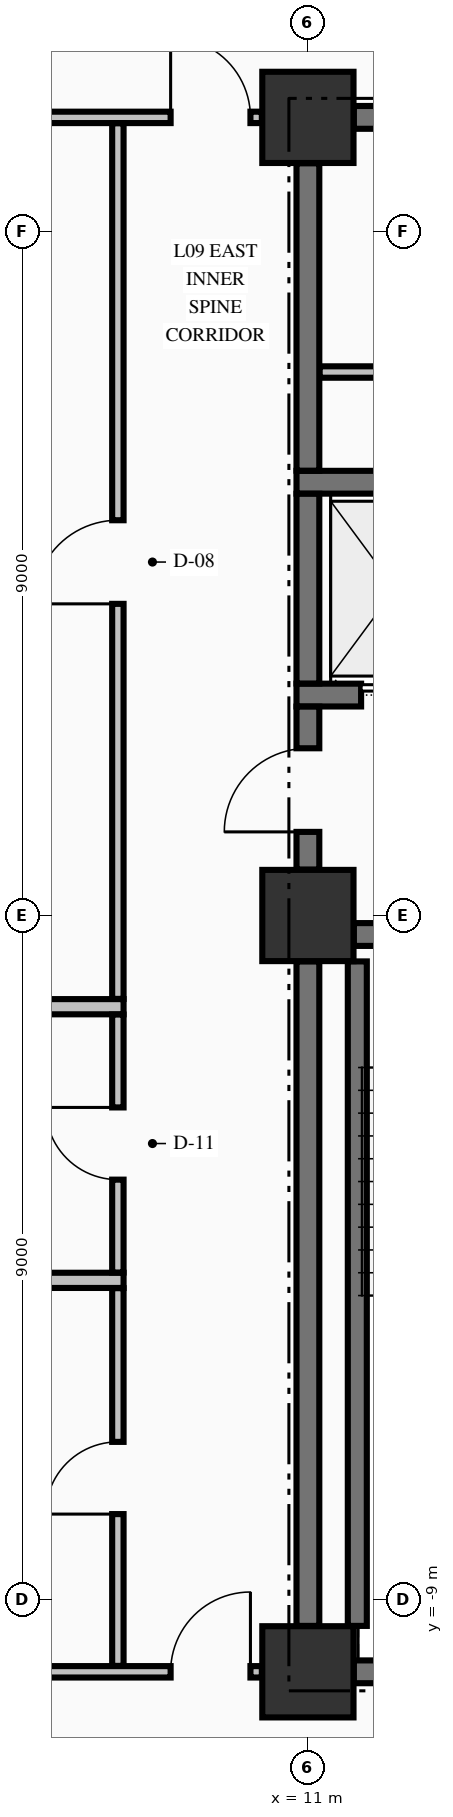
"""IFC4 building model, lengths in metres.
Left out: names, types, materials, properties, quantities, classifications, styles, units other than length and angle.
Written with IfcOpenShell. Run it as: python <this file> out.ifc"""

import sys

from ifc_helpers import new_model, si_unit, direction, frame, frame_2d, origin, origin_2d, place, context, subcontext, project, spatial, rectangle, extrude, element, fill, save


model = new_model("IFC4")
c1 = context("Model", 3, precision=1e-05, world=origin(), true_north=direction((0.0, 1.0)))
c2 = subcontext(c1, "Body", "Model", "MODEL_VIEW")
j1 = project(units=[si_unit("LENGTHUNIT", "METRE"), si_unit("PLANEANGLEUNIT", "RADIAN")], contexts=[c1])
p1 = place(None, origin())
s1 = spatial("IfcSite", under=j1, at=p1, CompositionType="ELEMENT")
p2 = place(p1, origin())
s2 = spatial("IfcBuilding", under=s1, at=p2, CompositionType="ELEMENT")
p3 = place(p2, frame((0.0, 0.0, 41.48)))
s3 = spatial("IfcBuildingStorey", under=s2, at=p3, CompositionType="ELEMENT", Elevation=41.48)
for number, where, z_axis, x_axis in (
    (1, (11.0, -9.95, -0.25), (0.0, 0.0, 1.0), (1.0, 0.0, 0.0)),
    (2, (11.0, 0.0, -0.25), (0.0, 0.0, 1.0), (1.0, 0.0, 0.0)),
    (3, (11.0, 10.5, -0.25), (0.0, 0.0, 1.0), (1.0, 0.0, 0.0)),
):
    element("IfcColumn", number, at=place(p3, frame(where, z_axis=z_axis, x_axis=x_axis)), inside=s3, PredefinedType="COLUMN", context=c2, shape_type="SweptSolid", body=[
        extrude(rectangle(XDim=1.2, YDim=1.2, at=origin_2d()), origin(), (0.0, 0.0, 1.0), 3.57),
    ])
p4 = place(p3, frame((11.604, -9.95, 0.0), z_axis=(0.0, 0.0, 1.0), x_axis=(1.0, 0.0, 0.0)))
e4 = element("IfcWall", 4, at=p4, inside=s3, PredefinedType="SHEAR", context=c2, shape_type="SweptSolid", body=[
    extrude(rectangle(XDim=3.096, YDim=0.3, at=frame_2d((1.548, 0.0))), origin(), (0.0, 0.0, 1.0), 3.32),
])
p5 = place(p3, frame((11.604, -0.25, 0.0), z_axis=(0.0, 0.0, 1.0), x_axis=(1.0, 0.0, 0.0)))
e5 = element("IfcWall", 5, at=p5, inside=s3, PredefinedType="SHEAR", context=c2, shape_type="SweptSolid", body=[
    extrude(rectangle(XDim=3.271, YDim=0.3, at=frame_2d((1.635, 0.0))), origin(), (0.0, 0.0, 1.0), 3.32),
])
p6 = place(p5, frame((0.996, 0.0, 0.0)))
e6 = element("IfcOpeningElement", 6, at=p6, cuts=e5, PredefinedType="OPENING", context=c2, shape_type="SweptSolid", body=[
    extrude(rectangle(XDim=1.1, YDim=2.15, at=frame_2d((0.55, 1.075))), frame((0.0, 0.16, 0.0), z_axis=(0.0, -1.0, 0.0), x_axis=(1.0, 0.0, 0.0)), (0.0, 0.0, 1.0), 0.32),
])
p7 = place(p3, frame((10.85, 2.9, 0.0), z_axis=(0.0, 0.0, 1.0), x_axis=(1.0, 0.0, 0.0)))
e7 = element("IfcWall", 7, at=p7, inside=s3, PredefinedType="SHEAR", context=c2, shape_type="SweptSolid", body=[
    extrude(rectangle(XDim=4.025, YDim=0.3, at=frame_2d((2.012, 0.0))), origin(), (0.0, 0.0, 1.0), 3.32),
])
p8 = place(p7, frame((0.85, 0.0, 0.0)))
e8 = element("IfcOpeningElement", 8, at=p8, cuts=e7, PredefinedType="OPENING", context=c2, shape_type="SweptSolid", body=[
    extrude(rectangle(XDim=1.1, YDim=2.2, at=frame_2d((0.55, 1.1))), frame((0.0, 0.16, 0.0), z_axis=(0.0, -1.0, 0.0), x_axis=(1.0, 0.0, 0.0)), (0.0, 0.0, 1.0), 0.32),
])
p9 = place(p3, frame((10.85, 5.7, 0.0), z_axis=(0.0, 0.0, 1.0), x_axis=(1.0, 0.0, 0.0)))
e9 = element("IfcWall", 9, at=p9, inside=s3, PredefinedType="SHEAR", context=c2, shape_type="SweptSolid", body=[
    extrude(rectangle(XDim=4.025, YDim=0.3, at=frame_2d((2.012, 0.0))), origin(), (0.0, 0.0, 1.0), 3.32),
])
p10 = place(p3, frame((11.604, 10.5, 0.0), z_axis=(0.0, 0.0, 1.0), x_axis=(1.0, 0.0, 0.0)))
e10 = element("IfcWall", 10, at=p10, inside=s3, PredefinedType="SHEAR", context=c2, shape_type="SweptSolid", body=[
    extrude(rectangle(XDim=3.096, YDim=0.3, at=frame_2d((1.548, 0.0))), origin(), (0.0, 0.0, 1.0), 3.32),
])
p11 = place(p10, frame((1.841, 0.0, 0.0)))
e11 = element("IfcOpeningElement", 11, at=p11, cuts=e10, PredefinedType="OPENING", context=c2, shape_type="SweptSolid", body=[
    extrude(rectangle(XDim=0.95, YDim=2.15, at=frame_2d((0.475, 1.075))), frame((0.0, 0.16, 0.0), z_axis=(0.0, -1.0, 0.0), x_axis=(1.0, 0.0, 0.0)), (0.0, 0.0, 1.0), 0.32),
])
p12 = place(p3, frame((-10.394, -9.95, 0.0), z_axis=(0.0, 0.0, 1.0), x_axis=(1.0, 0.0, 0.0)))
e12 = element("IfcWall", 12, at=p12, inside=s3, PredefinedType="PARTITIONING", context=c2, shape_type="SweptSolid", body=[
    extrude(rectangle(XDim=20.788, YDim=0.15, at=frame_2d((10.394, 0.0))), origin(), (0.0, 0.0, 1.0), 3.32),
])
p13 = place(p12, frame((0.15, 0.0, 0.0)))
e13 = element("IfcOpeningElement", 13, at=p13, cuts=e12, PredefinedType="OPENING", context=c2, shape_type="SweptSolid", body=[
    extrude(rectangle(XDim=1.05, YDim=2.15, at=frame_2d((0.525, 1.075))), frame((0.0, 0.085, 0.0), z_axis=(0.0, -1.0, 0.0), x_axis=(1.0, 0.0, 0.0)), (0.0, 0.0, 1.0), 0.17),
])
p14 = place(p12, frame((19.588, 0.0, 0.0)))
e14 = element("IfcOpeningElement", 14, at=p14, cuts=e12, PredefinedType="OPENING", context=c2, shape_type="SweptSolid", body=[
    extrude(rectangle(XDim=1.05, YDim=2.15, at=frame_2d((0.525, 1.075))), frame((0.0, 0.085, 0.0), z_axis=(0.0, -1.0, 0.0), x_axis=(1.0, 0.0, 0.0)), (0.0, 0.0, 1.0), 0.17),
])
p15 = place(p12, frame((12.669, 0.0, 0.0)))
e15 = element("IfcOpeningElement", 15, at=p15, cuts=e12, PredefinedType="OPENING", context=c2, shape_type="SweptSolid", body=[
    extrude(rectangle(XDim=0.95, YDim=2.15, at=frame_2d((0.475, 1.075))), frame((0.0, 0.085, 0.0), z_axis=(0.0, -1.0, 0.0), x_axis=(1.0, 0.0, 0.0)), (0.0, 0.0, 1.0), 0.17),
])
for number, where, z_axis, x_axis in (
    (16, (-0.1, -4.8, 0.0), (0.0, 0.0, 1.0), (1.0, 0.0, 0.0)),
    (17, (-0.1, -1.2, 0.0), (0.0, 0.0, 1.0), (1.0, 0.0, 0.0)),
):
    element("IfcWall", number, at=place(p3, frame(where, z_axis=z_axis, x_axis=x_axis)), inside=s3, PredefinedType="PARTITIONING", context=c2, shape_type="SweptSolid", body=[
        extrude(rectangle(XDim=8.675, YDim=0.2, at=frame_2d((4.337, 0.0))), origin(), (0.0, 0.0, 1.0), 3.32),
    ])
p16 = place(p3, frame((11.153, 7.15, 0.0), z_axis=(0.0, 0.0, 1.0), x_axis=(1.0, 0.0, 0.0)))
e18 = element("IfcWall", 18, at=p16, inside=s3, PredefinedType="PARTITIONING", context=c2, shape_type="SweptSolid", body=[
    extrude(rectangle(XDim=2.072, YDim=0.15, at=frame_2d((1.036, 0.0))), origin(), (0.0, 0.0, 1.0), 3.32),
])
p17 = place(p3, frame((-10.394, 10.5, 0.0), z_axis=(0.0, 0.0, 1.0), x_axis=(1.0, 0.0, 0.0)))
e19 = element("IfcWall", 19, at=p17, inside=s3, PredefinedType="PARTITIONING", context=c2, shape_type="SweptSolid", body=[
    extrude(rectangle(XDim=20.788, YDim=0.15, at=frame_2d((10.394, 0.0))), origin(), (0.0, 0.0, 1.0), 3.32),
])
p18 = place(p17, frame((0.15, 0.0, 0.0)))
e20 = element("IfcOpeningElement", 20, at=p18, cuts=e19, PredefinedType="OPENING", context=c2, shape_type="SweptSolid", body=[
    extrude(rectangle(XDim=1.05, YDim=2.15, at=frame_2d((0.525, 1.075))), frame((0.0, 0.085, 0.0), z_axis=(0.0, -1.0, 0.0), x_axis=(1.0, 0.0, 0.0)), (0.0, 0.0, 1.0), 0.17),
])
p19 = place(p17, frame((19.588, 0.0, 0.0)))
e21 = element("IfcOpeningElement", 21, at=p19, cuts=e19, PredefinedType="OPENING", context=c2, shape_type="SweptSolid", body=[
    extrude(rectangle(XDim=1.05, YDim=2.15, at=frame_2d((0.525, 1.075))), frame((0.0, 0.085, 0.0), z_axis=(0.0, -1.0, 0.0), x_axis=(1.0, 0.0, 0.0)), (0.0, 0.0, 1.0), 0.17),
])
p20 = place(p3, frame((11.0, -9.346, 0.0), z_axis=(0.0, 0.0, 1.0), x_axis=(0.0, 1.0, 0.0)))
e22 = element("IfcWall", 22, at=p20, inside=s3, PredefinedType="SHEAR", context=c2, shape_type="SweptSolid", body=[
    extrude(rectangle(XDim=8.742, YDim=0.3, at=frame_2d((4.371, 0.0))), origin(), (0.0, 0.0, 1.0), 3.32),
])
p21 = place(p3, frame((11.0, 0.604, 0.0), z_axis=(0.0, 0.0, 1.0), x_axis=(0.0, 1.0, 0.0)))
e23 = element("IfcWall", 23, at=p21, inside=s3, PredefinedType="SHEAR", context=c2, shape_type="SweptSolid", body=[
    extrude(rectangle(XDim=2.144, YDim=0.3, at=frame_2d((1.072, 0.0))), origin(), (0.0, 0.0, 1.0), 3.32),
])
p22 = place(p21, frame((0.496, 0.0, 0.0)))
e24 = element("IfcOpeningElement", 24, at=p22, cuts=e23, PredefinedType="OPENING", context=c2, shape_type="SweptSolid", body=[
    extrude(rectangle(XDim=1.1, YDim=2.15, at=frame_2d((0.55, 1.075))), frame((0.0, 0.16, 0.0), z_axis=(0.0, -1.0, 0.0), x_axis=(1.0, 0.0, 0.0)), (0.0, 0.0, 1.0), 0.32),
])
p23 = place(p3, frame((11.0, 3.052, 0.0), z_axis=(0.0, 0.0, 1.0), x_axis=(0.0, 1.0, 0.0)))
e25 = element("IfcWall", 25, at=p23, inside=s3, PredefinedType="SHEAR", context=c2, shape_type="SweptSolid", body=[
    extrude(rectangle(XDim=2.496, YDim=0.3, at=frame_2d((1.248, 0.0))), origin(), (0.0, 0.0, 1.0), 3.32),
])
p24 = place(p3, frame((11.0, 5.852, 0.0), z_axis=(0.0, 0.0, 1.0), x_axis=(0.0, 1.0, 0.0)))
e26 = element("IfcWall", 26, at=p24, inside=s3, PredefinedType="SHEAR", context=c2, shape_type="SweptSolid", body=[
    extrude(rectangle(XDim=4.044, YDim=0.3, at=frame_2d((2.022, 0.0))), origin(), (0.0, 0.0, 1.0), 3.32),
])
p25 = place(p3, frame((11.65, -9.346, 0.0), z_axis=(0.0, 0.0, 1.0), x_axis=(0.0, 1.0, 0.0)))
e27 = element("IfcWall", 27, at=p25, inside=s3, PredefinedType="SOLIDWALL", context=c2, shape_type="SweptSolid", body=[
    extrude(rectangle(XDim=8.742, YDim=0.25, at=frame_2d((4.371, 0.0))), origin(), (0.0, 0.0, 1.0), 3.32),
])
p26 = place(p3, frame((8.5, -9.872, 0.0), z_axis=(0.0, 0.0, 1.0), x_axis=(0.0, 1.0, 0.0)))
e28 = element("IfcWall", 28, at=p26, inside=s3, PredefinedType="PARTITIONING", context=c2, shape_type="SweptSolid", body=[
    extrude(rectangle(XDim=4.969, YDim=0.15, at=frame_2d((2.484, 0.0))), origin(), (0.0, 0.0, 1.0), 3.32),
])
p27 = place(p26, frame((1.997, 0.0, 0.0)))
e29 = element("IfcOpeningElement", 29, at=p27, cuts=e28, PredefinedType="OPENING", context=c2, shape_type="SweptSolid", body=[
    extrude(rectangle(XDim=0.95, YDim=2.15, at=frame_2d((0.475, 1.075))), frame((0.0, 0.085, 0.0), z_axis=(0.0, -1.0, 0.0), x_axis=(1.0, 0.0, 0.0)), (0.0, 0.0, 1.0), 0.17),
])
p28 = place(p3, frame((8.5, -4.697, 0.0), z_axis=(0.0, 0.0, 1.0), x_axis=(0.0, 1.0, 0.0)))
e30 = element("IfcWall", 30, at=p28, inside=s3, PredefinedType="PARTITIONING", context=c2, shape_type="SweptSolid", body=[
    extrude(rectangle(XDim=3.394, YDim=0.15, at=frame_2d((1.697, 0.0))), origin(), (0.0, 0.0, 1.0), 3.32),
])
p29 = place(p28, frame((1.222, 0.0, 0.0)))
e31 = element("IfcOpeningElement", 31, at=p29, cuts=e30, PredefinedType="OPENING", context=c2, shape_type="SweptSolid", body=[
    extrude(rectangle(XDim=0.95, YDim=2.15, at=frame_2d((0.475, 1.075))), frame((0.0, 0.085, 0.0), z_axis=(0.0, -1.0, 0.0), x_axis=(1.0, 0.0, 0.0)), (0.0, 0.0, 1.0), 0.17),
])
p30 = place(p3, frame((8.5, -1.097, 0.0), z_axis=(0.0, 0.0, 1.0), x_axis=(0.0, 1.0, 0.0)))
e32 = element("IfcWall", 32, at=p30, inside=s3, PredefinedType="PARTITIONING", context=c2, shape_type="SweptSolid", body=[
    extrude(rectangle(XDim=11.519, YDim=0.15, at=frame_2d((5.76, 0.0))), origin(), (0.0, 0.0, 1.0), 3.32),
])
p31 = place(p30, frame((5.197, 0.0, 0.0)))
e33 = element("IfcOpeningElement", 33, at=p31, cuts=e32, PredefinedType="OPENING", context=c2, shape_type="SweptSolid", body=[
    extrude(rectangle(XDim=1.1, YDim=2.15, at=frame_2d((0.55, 1.075))), frame((0.0, 0.085, 0.0), z_axis=(0.0, -1.0, 0.0), x_axis=(1.0, 0.0, 0.0)), (0.0, 0.0, 1.0), 0.17),
])
p32 = place(p22, origin())
e34 = element("IfcDoor", 34, at=p32, inside=s3, OperationType="SINGLE_SWING_LEFT", PredefinedType="DOOR", context=c2, shape_type="SweptSolid", body=[
    extrude(rectangle(XDim=1.1, YDim=2.15, at=frame_2d((0.55, 1.075))), frame((0.0, 0.025, 0.0), z_axis=(0.0, -1.0, 0.0), x_axis=(1.0, 0.0, 0.0)), (0.0, 0.0, 1.0), 0.05),
])
fill(e24, e34)
p33 = place(p8, origin())
e35 = element("IfcDoor", 35, at=p33, inside=s3, OperationType="SLIDING_TO_RIGHT", PredefinedType="DOOR", context=c2, shape_type="SweptSolid", body=[
    extrude(rectangle(XDim=1.1, YDim=2.2, at=frame_2d((0.55, 1.1))), frame((0.0, 0.025, 0.0), z_axis=(0.0, -1.0, 0.0), x_axis=(1.0, 0.0, 0.0)), (0.0, 0.0, 1.0), 0.05),
])
fill(e8, e35)
p34 = place(p19, origin())
e36 = element("IfcDoor", 36, at=p34, inside=s3, OperationType="SINGLE_SWING_LEFT", PredefinedType="DOOR", context=c2, shape_type="SweptSolid", body=[
    extrude(rectangle(XDim=1.05, YDim=2.15, at=frame_2d((0.525, 1.075))), frame((0.0, 0.025, 0.0), z_axis=(0.0, -1.0, 0.0), x_axis=(1.0, 0.0, 0.0)), (0.0, 0.0, 1.0), 0.05),
])
fill(e21, e36)
p35 = place(p14, origin())
e37 = element("IfcDoor", 37, at=p35, inside=s3, OperationType="SINGLE_SWING_RIGHT", PredefinedType="DOOR", context=c2, shape_type="SweptSolid", body=[
    extrude(rectangle(XDim=1.05, YDim=2.15, at=frame_2d((0.525, 1.075))), frame((0.0, 0.025, 0.0), z_axis=(0.0, -1.0, 0.0), x_axis=(1.0, 0.0, 0.0)), (0.0, 0.0, 1.0), 0.05),
])
fill(e14, e37)
p36 = place(p31, origin())
e38 = element("IfcDoor", 38, at=p36, inside=s3, OperationType="SINGLE_SWING_LEFT", PredefinedType="DOOR", context=c2, shape_type="SweptSolid", body=[
    extrude(rectangle(XDim=1.1, YDim=2.15, at=frame_2d((0.55, 1.075))), frame((0.0, 0.025, 0.0), z_axis=(0.0, -1.0, 0.0), x_axis=(1.0, 0.0, 0.0)), (0.0, 0.0, 1.0), 0.05),
])
fill(e33, e38)
p37 = place(p29, origin())
e39 = element("IfcDoor", 39, at=p37, inside=s3, OperationType="SINGLE_SWING_RIGHT", PredefinedType="DOOR", context=c2, shape_type="SweptSolid", body=[
    extrude(rectangle(XDim=0.95, YDim=2.15, at=frame_2d((0.475, 1.075))), frame((0.0, 0.025, 0.0), z_axis=(0.0, -1.0, 0.0), x_axis=(1.0, 0.0, 0.0)), (0.0, 0.0, 1.0), 0.05),
])
fill(e31, e39)
p38 = place(p27, origin())
e40 = element("IfcDoor", 40, at=p38, inside=s3, OperationType="SINGLE_SWING_LEFT", PredefinedType="DOOR", context=c2, shape_type="SweptSolid", body=[
    extrude(rectangle(XDim=0.95, YDim=2.15, at=frame_2d((0.475, 1.075))), frame((0.0, 0.025, 0.0), z_axis=(0.0, -1.0, 0.0), x_axis=(1.0, 0.0, 0.0)), (0.0, 0.0, 1.0), 0.05),
])
fill(e29, e40)
save(model, sys.argv[1])
